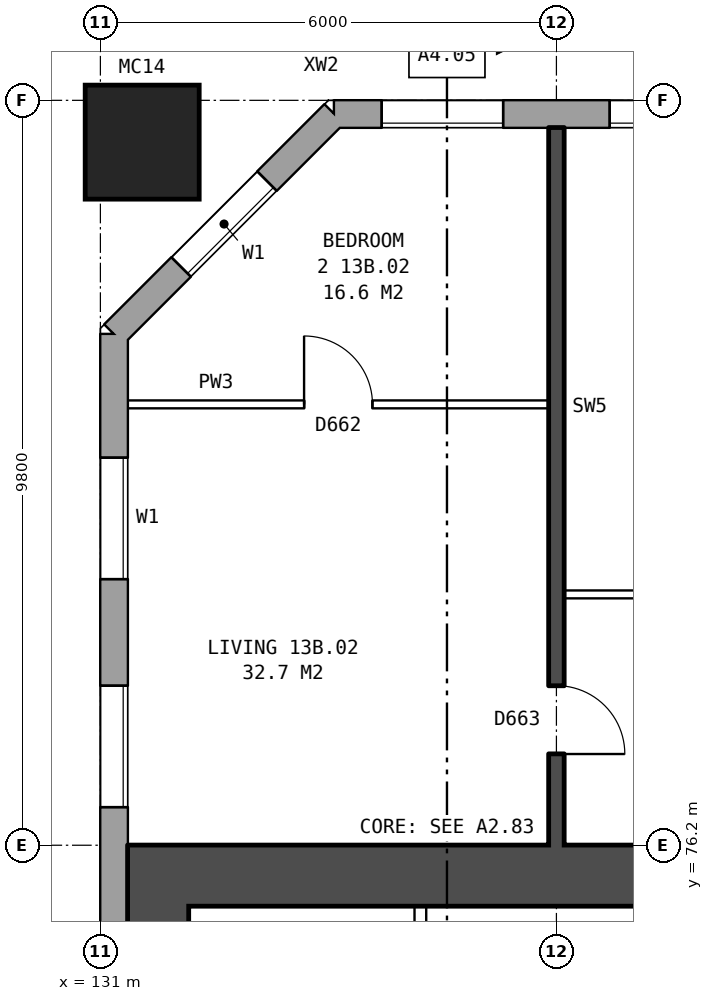
"""IFC4 building model, lengths in metres.
Left out: names, types, materials, properties, quantities, classifications, styles, units other than length and angle.
Written with IfcOpenShell. Run it as: python <this file> out.ifc"""

import sys

from ifc_helpers import new_model, si_unit, direction, frame, frame_2d, origin, origin_2d, place, context, subcontext, project, spatial, rectangle, hollow_rectangle, extrude, element, fill, save


model = new_model("IFC4")
c1 = context("Model", 3, precision=1e-05, world=origin(), true_north=direction((0.0, 1.0)))
c2 = subcontext(c1, "Body", "Model", "MODEL_VIEW")
j1 = project(units=[si_unit("LENGTHUNIT", "METRE"), si_unit("PLANEANGLEUNIT", "RADIAN")], contexts=[c1])
p1 = place(None, origin())
s1 = spatial("IfcSite", under=j1, at=p1, CompositionType="ELEMENT")
p2 = place(p1, origin())
s2 = spatial("IfcBuilding", under=s1, at=p2, CompositionType="ELEMENT")
p3 = place(p2, frame((0.0, 0.0, 50.5)))
s3 = spatial("IfcBuildingStorey", under=s2, at=p3, CompositionType="ELEMENT", Elevation=50.5)
p4 = place(p3, frame((131.55, 85.45, 0.0), z_axis=(0.0, 0.0, 1.0), x_axis=(1.0, 0.0, 0.0)))
e1 = element("IfcColumn", 1, at=p4, inside=s3, PredefinedType="COLUMN", context=c2, shape_type="SweptSolid", body=[
    extrude(hollow_rectangle(XDim=1.5, YDim=1.5, WallThickness=0.08, at=origin_2d()), origin(), (0.0, 0.0, 1.0), 3.1),
])
p5 = place(p3, frame((173.425, 85.82, 0.0), z_axis=(0.0, 0.0, 1.0), x_axis=(-1.0, 0.0, 0.0)))
e2 = element("IfcWall", 2, at=p5, inside=s3, PredefinedType="STANDARD", context=c2, shape_type="SweptSolid", body=[
    extrude(rectangle(XDim=39.351, YDim=0.36, at=frame_2d((19.675, 0.0))), origin(), (0.0, 0.0, 1.0), 2.85),
])
p6 = place(p5, frame((1.125, 0.0, 0.8)))
e3 = element("IfcOpeningElement", 3, at=p6, cuts=e2, PredefinedType="OPENING", context=c2, shape_type="SweptSolid", body=[
    extrude(rectangle(XDim=1.6, YDim=1.8, at=frame_2d((0.8, 0.9))), frame((0.0, 0.19, 0.0), z_axis=(0.0, -1.0, 0.0), x_axis=(1.0, 0.0, 0.0)), (0.0, 0.0, 1.0), 0.38),
])
p7 = place(p5, frame((4.125, 0.0, 0.8)))
e4 = element("IfcOpeningElement", 4, at=p7, cuts=e2, PredefinedType="OPENING", context=c2, shape_type="SweptSolid", body=[
    extrude(rectangle(XDim=1.6, YDim=1.8, at=frame_2d((0.8, 0.9))), frame((0.0, 0.19, 0.0), z_axis=(0.0, -1.0, 0.0), x_axis=(1.0, 0.0, 0.0)), (0.0, 0.0, 1.0), 0.38),
])
p8 = place(p5, frame((7.725, 0.0, 0.8)))
e5 = element("IfcOpeningElement", 5, at=p8, cuts=e2, PredefinedType="OPENING", context=c2, shape_type="SweptSolid", body=[
    extrude(rectangle(XDim=0.6, YDim=0.9, at=frame_2d((0.3, 0.45))), frame((0.0, 0.19, 0.0), z_axis=(0.0, -1.0, 0.0), x_axis=(1.0, 0.0, 0.0)), (0.0, 0.0, 1.0), 0.38),
])
p9 = place(p5, frame((10.125, 0.0, 0.8)))
e6 = element("IfcOpeningElement", 6, at=p9, cuts=e2, PredefinedType="OPENING", context=c2, shape_type="SweptSolid", body=[
    extrude(rectangle(XDim=1.6, YDim=1.8, at=frame_2d((0.8, 0.9))), frame((0.0, 0.19, 0.0), z_axis=(0.0, -1.0, 0.0), x_axis=(1.0, 0.0, 0.0)), (0.0, 0.0, 1.0), 0.38),
])
p10 = place(p5, frame((13.125, 0.0, 0.8)))
e7 = element("IfcOpeningElement", 7, at=p10, cuts=e2, PredefinedType="OPENING", context=c2, shape_type="SweptSolid", body=[
    extrude(rectangle(XDim=1.6, YDim=1.8, at=frame_2d((0.8, 0.9))), frame((0.0, 0.19, 0.0), z_axis=(0.0, -1.0, 0.0), x_axis=(1.0, 0.0, 0.0)), (0.0, 0.0, 1.0), 0.38),
])
p11 = place(p5, frame((16.125, 0.0, 0.8)))
e8 = element("IfcOpeningElement", 8, at=p11, cuts=e2, PredefinedType="OPENING", context=c2, shape_type="SweptSolid", body=[
    extrude(rectangle(XDim=1.6, YDim=1.8, at=frame_2d((0.8, 0.9))), frame((0.0, 0.19, 0.0), z_axis=(0.0, -1.0, 0.0), x_axis=(1.0, 0.0, 0.0)), (0.0, 0.0, 1.0), 0.38),
])
p12 = place(p5, frame((19.125, 0.0, 0.8)))
e9 = element("IfcOpeningElement", 9, at=p12, cuts=e2, PredefinedType="OPENING", context=c2, shape_type="SweptSolid", body=[
    extrude(rectangle(XDim=1.6, YDim=1.8, at=frame_2d((0.8, 0.9))), frame((0.0, 0.19, 0.0), z_axis=(0.0, -1.0, 0.0), x_axis=(1.0, 0.0, 0.0)), (0.0, 0.0, 1.0), 0.38),
])
p13 = place(p5, frame((22.125, 0.0, 0.8)))
e10 = element("IfcOpeningElement", 10, at=p13, cuts=e2, PredefinedType="OPENING", context=c2, shape_type="SweptSolid", body=[
    extrude(rectangle(XDim=1.6, YDim=1.8, at=frame_2d((0.8, 0.9))), frame((0.0, 0.19, 0.0), z_axis=(0.0, -1.0, 0.0), x_axis=(1.0, 0.0, 0.0)), (0.0, 0.0, 1.0), 0.38),
])
p14 = place(p5, frame((25.125, 0.0, 0.8)))
e11 = element("IfcOpeningElement", 11, at=p14, cuts=e2, PredefinedType="OPENING", context=c2, shape_type="SweptSolid", body=[
    extrude(rectangle(XDim=1.6, YDim=1.8, at=frame_2d((0.8, 0.9))), frame((0.0, 0.19, 0.0), z_axis=(0.0, -1.0, 0.0), x_axis=(1.0, 0.0, 0.0)), (0.0, 0.0, 1.0), 0.38),
])
p15 = place(p5, frame((28.125, 0.0, 0.8)))
e12 = element("IfcOpeningElement", 12, at=p15, cuts=e2, PredefinedType="OPENING", context=c2, shape_type="SweptSolid", body=[
    extrude(rectangle(XDim=1.6, YDim=1.8, at=frame_2d((0.8, 0.9))), frame((0.0, 0.19, 0.0), z_axis=(0.0, -1.0, 0.0), x_axis=(1.0, 0.0, 0.0)), (0.0, 0.0, 1.0), 0.38),
])
p16 = place(p5, frame((30.625, 0.0, 0.8)))
e13 = element("IfcOpeningElement", 13, at=p16, cuts=e2, PredefinedType="OPENING", context=c2, shape_type="SweptSolid", body=[
    extrude(rectangle(XDim=1.0, YDim=0.9, at=frame_2d((0.5, 0.45))), frame((0.0, 0.19, 0.0), z_axis=(0.0, -1.0, 0.0), x_axis=(1.0, 0.0, 0.0)), (0.0, 0.0, 1.0), 0.38),
])
p17 = place(p5, frame((34.125, 0.0, 0.8)))
e14 = element("IfcOpeningElement", 14, at=p17, cuts=e2, PredefinedType="OPENING", context=c2, shape_type="SweptSolid", body=[
    extrude(rectangle(XDim=1.6, YDim=1.8, at=frame_2d((0.8, 0.9))), frame((0.0, 0.19, 0.0), z_axis=(0.0, -1.0, 0.0), x_axis=(1.0, 0.0, 0.0)), (0.0, 0.0, 1.0), 0.38),
])
p18 = place(p5, frame((37.125, 0.0, 0.8)))
e15 = element("IfcOpeningElement", 15, at=p18, cuts=e2, PredefinedType="OPENING", context=c2, shape_type="SweptSolid", body=[
    extrude(rectangle(XDim=1.6, YDim=1.8, at=frame_2d((0.8, 0.9))), frame((0.0, 0.19, 0.0), z_axis=(0.0, -1.0, 0.0), x_axis=(1.0, 0.0, 0.0)), (0.0, 0.0, 1.0), 0.38),
])
p19 = place(p5, frame((8.625, 0.0, 0.8)))
e16 = element("IfcOpeningElement", 16, at=p19, cuts=e2, PredefinedType="OPENING", context=c2, shape_type="SweptSolid", body=[
    extrude(rectangle(XDim=0.6, YDim=1.5, at=frame_2d((0.3, 0.75))), frame((0.0, 0.19, 0.0), z_axis=(0.0, -1.0, 0.0), x_axis=(1.0, 0.0, 0.0)), (0.0, 0.0, 1.0), 0.38),
])
p20 = place(p5, frame((32.875, 0.0, 1.7)))
e17 = element("IfcOpeningElement", 17, at=p20, cuts=e2, PredefinedType="OPENING", context=c2, shape_type="SweptSolid", body=[
    extrude(rectangle(XDim=0.8, YDim=0.9, at=frame_2d((0.4, 0.45))), frame((0.0, 0.19, 0.0), z_axis=(0.0, -1.0, 0.0), x_axis=(1.0, 0.0, 0.0)), (0.0, 0.0, 1.0), 0.38),
])
p21 = place(p3, frame((134.075, 85.82, 0.0), z_axis=(0.0, 0.0, 1.0), x_axis=(-0.707106781187, -0.707106781187, 0.0)))
e18 = element("IfcWall", 18, at=p21, inside=s3, PredefinedType="STANDARD", context=c2, shape_type="SweptSolid", body=[
    extrude(rectangle(XDim=4.094, YDim=0.36, at=frame_2d((2.047, 0.0))), origin(), (0.0, 0.0, 1.0), 2.85),
])
p22 = place(p21, frame((1.247, 0.0, 0.8)))
e19 = element("IfcOpeningElement", 19, at=p22, cuts=e18, PredefinedType="OPENING", context=c2, shape_type="SweptSolid", body=[
    extrude(rectangle(XDim=1.6, YDim=1.8, at=frame_2d((0.8, 0.9))), frame((0.0, 0.19, 0.0), z_axis=(0.0, -1.0, 0.0), x_axis=(1.0, 0.0, 0.0)), (0.0, 0.0, 1.0), 0.38),
])
p23 = place(p3, frame((131.18, 82.925, 0.0), z_axis=(0.0, 0.0, 1.0), x_axis=(0.0, -1.0, 0.0)))
e20 = element("IfcWall", 20, at=p23, inside=s3, PredefinedType="STANDARD", context=c2, shape_type="SweptSolid", body=[
    extrude(rectangle(XDim=25.851, YDim=0.36, at=frame_2d((12.925, 0.0))), origin(), (0.0, 0.0, 1.0), 2.85),
])
p24 = place(p23, frame((1.625, 0.0, 0.8)))
e21 = element("IfcOpeningElement", 21, at=p24, cuts=e20, PredefinedType="OPENING", context=c2, shape_type="SweptSolid", body=[
    extrude(rectangle(XDim=1.6, YDim=1.8, at=frame_2d((0.8, 0.9))), frame((0.0, 0.19, 0.0), z_axis=(0.0, -1.0, 0.0), x_axis=(1.0, 0.0, 0.0)), (0.0, 0.0, 1.0), 0.38),
])
p25 = place(p23, frame((4.625, 0.0, 0.8)))
e22 = element("IfcOpeningElement", 22, at=p25, cuts=e20, PredefinedType="OPENING", context=c2, shape_type="SweptSolid", body=[
    extrude(rectangle(XDim=1.6, YDim=1.8, at=frame_2d((0.8, 0.9))), frame((0.0, 0.19, 0.0), z_axis=(0.0, -1.0, 0.0), x_axis=(1.0, 0.0, 0.0)), (0.0, 0.0, 1.0), 0.38),
])
p26 = place(p23, frame((19.625, 0.0, 0.8)))
e23 = element("IfcOpeningElement", 23, at=p26, cuts=e20, PredefinedType="OPENING", context=c2, shape_type="SweptSolid", body=[
    extrude(rectangle(XDim=1.6, YDim=1.8, at=frame_2d((0.8, 0.9))), frame((0.0, 0.19, 0.0), z_axis=(0.0, -1.0, 0.0), x_axis=(1.0, 0.0, 0.0)), (0.0, 0.0, 1.0), 0.38),
])
p27 = place(p23, frame((22.625, 0.0, 0.8)))
e24 = element("IfcOpeningElement", 24, at=p27, cuts=e20, PredefinedType="OPENING", context=c2, shape_type="SweptSolid", body=[
    extrude(rectangle(XDim=1.6, YDim=1.8, at=frame_2d((0.8, 0.9))), frame((0.0, 0.19, 0.0), z_axis=(0.0, -1.0, 0.0), x_axis=(1.0, 0.0, 0.0)), (0.0, 0.0, 1.0), 0.38),
])
p28 = place(p3, frame((131.76, 64.6, 0.0), z_axis=(0.0, 0.0, 1.0), x_axis=(0.0, 1.0, 0.0)))
e25 = element("IfcWall", 25, at=p28, inside=s3, PredefinedType="SHEAR", context=c2, shape_type="SweptSolid", body=[
    extrude(rectangle(XDim=10.8, YDim=0.8, at=frame_2d((5.4, 0.0))), origin(), (0.0, 0.0, 1.0), 2.85),
])
p29 = place(p3, frame((139.76, 75.8, 0.0), z_axis=(0.0, 0.0, 1.0), x_axis=(-1.0, 0.0, 0.0)))
e26 = element("IfcWall", 26, at=p29, inside=s3, PredefinedType="SHEAR", context=c2, shape_type="SweptSolid", body=[
    extrude(rectangle(XDim=8.4, YDim=0.8, at=frame_2d((4.2, 0.0))), origin(), (0.0, 0.0, 1.0), 2.85),
])
p30 = place(p3, frame((135.21, 71.425, 0.0), z_axis=(0.0, 0.0, 1.0), x_axis=(0.0, 1.0, 0.0)))
e27 = element("IfcWall", 27, at=p30, inside=s3, PredefinedType="PARTITIONING", context=c2, shape_type="SweptSolid", body=[
    extrude(rectangle(XDim=3.975, YDim=0.15, at=frame_2d((1.987, 0.0))), origin(), (0.0, 0.0, 1.0), 2.85),
])
p31 = place(p30, frame((0.462, 0.0, 0.0)))
e28 = element("IfcOpeningElement", 28, at=p31, cuts=e27, PredefinedType="OPENING", context=c2, shape_type="SweptSolid", body=[
    extrude(rectangle(XDim=1.1, YDim=2.1, at=frame_2d((0.55, 1.05))), frame((0.0, 0.085, 0.0), z_axis=(0.0, -1.0, 0.0), x_axis=(1.0, 0.0, 0.0)), (0.0, 0.0, 1.0), 0.17),
])
p32 = place(p3, frame((137.1, 79.5, 0.0), z_axis=(0.0, 0.0, 1.0), x_axis=(1.0, 0.0, 0.0)))
e29 = element("IfcWall", 29, at=p32, inside=s3, PredefinedType="PARTITIONING", context=c2, shape_type="SweptSolid", body=[
    extrude(rectangle(XDim=5.8, YDim=0.1, at=frame_2d((2.9, 0.0))), origin(), (0.0, 0.0, 1.0), 2.85),
])
p33 = place(p32, frame((1.3, 0.0, 0.0)))
e30 = element("IfcOpeningElement", 30, at=p33, cuts=e29, PredefinedType="OPENING", context=c2, shape_type="SweptSolid", body=[
    extrude(rectangle(XDim=0.9, YDim=2.1, at=frame_2d((0.45, 1.05))), frame((0.0, 0.06, 0.0), z_axis=(0.0, -1.0, 0.0), x_axis=(1.0, 0.0, 0.0)), (0.0, 0.0, 1.0), 0.12),
])
p34 = place(p32, frame((4.2, 0.0, 0.0)))
e31 = element("IfcOpeningElement", 31, at=p34, cuts=e29, PredefinedType="OPENING", context=c2, shape_type="SweptSolid", body=[
    extrude(rectangle(XDim=0.9, YDim=2.1, at=frame_2d((0.45, 1.05))), frame((0.0, 0.06, 0.0), z_axis=(0.0, -1.0, 0.0), x_axis=(1.0, 0.0, 0.0)), (0.0, 0.0, 1.0), 0.12),
])
p35 = place(p3, frame((131.36, 82.0, 0.0), z_axis=(0.0, 0.0, 1.0), x_axis=(1.0, 0.0, 0.0)))
e32 = element("IfcWall", 32, at=p35, inside=s3, PredefinedType="PARTITIONING", context=c2, shape_type="SweptSolid", body=[
    extrude(rectangle(XDim=5.54, YDim=0.1, at=frame_2d((2.77, 0.0))), origin(), (0.0, 0.0, 1.0), 2.85),
])
p36 = place(p35, frame((2.32, 0.0, 0.0)))
e33 = element("IfcOpeningElement", 33, at=p36, cuts=e32, PredefinedType="OPENING", context=c2, shape_type="SweptSolid", body=[
    extrude(rectangle(XDim=0.9, YDim=2.1, at=frame_2d((0.45, 1.05))), frame((0.0, 0.06, 0.0), z_axis=(0.0, -1.0, 0.0), x_axis=(1.0, 0.0, 0.0)), (0.0, 0.0, 1.0), 0.12),
])
p37 = place(p3, frame((137.0, 76.2, 0.0), z_axis=(0.0, 0.0, 1.0), x_axis=(0.0, 1.0, 0.0)))
e34 = element("IfcWall", 34, at=p37, inside=s3, PredefinedType="SOLIDWALL", context=c2, shape_type="SweptSolid", body=[
    extrude(rectangle(XDim=9.44, YDim=0.2, at=frame_2d((4.72, 0.0))), origin(), (0.0, 0.0, 1.0), 2.85),
])
p38 = place(p37, frame((1.2, 0.0, 0.0)))
e35 = element("IfcOpeningElement", 35, at=p38, cuts=e34, PredefinedType="OPENING", context=c2, shape_type="SweptSolid", body=[
    extrude(rectangle(XDim=0.9, YDim=2.1, at=frame_2d((0.45, 1.05))), frame((0.0, 0.11, 0.0), z_axis=(0.0, -1.0, 0.0), x_axis=(1.0, 0.0, 0.0)), (0.0, 0.0, 1.0), 0.22),
])
p39 = place(p17, origin())
e36 = element("IfcWindow", 36, at=p39, inside=s3, PartitioningType="SINGLE_PANEL", PredefinedType="WINDOW", context=c2, shape_type="SweptSolid", body=[
    extrude(rectangle(XDim=1.6, YDim=1.8, at=frame_2d((0.8, 0.9))), frame((0.0, 0.15, 0.0), z_axis=(0.0, -1.0, 0.0), x_axis=(1.0, 0.0, 0.0)), (0.0, 0.0, 1.0), 0.06),
])
fill(e14, e36)
p40 = place(p18, origin())
e37 = element("IfcWindow", 37, at=p40, inside=s3, PartitioningType="SINGLE_PANEL", PredefinedType="WINDOW", context=c2, shape_type="SweptSolid", body=[
    extrude(rectangle(XDim=1.6, YDim=1.8, at=frame_2d((0.8, 0.9))), frame((0.0, 0.15, 0.0), z_axis=(0.0, -1.0, 0.0), x_axis=(1.0, 0.0, 0.0)), (0.0, 0.0, 1.0), 0.06),
])
fill(e15, e37)
p41 = place(p22, origin())
e38 = element("IfcWindow", 38, at=p41, inside=s3, PartitioningType="SINGLE_PANEL", PredefinedType="WINDOW", context=c2, shape_type="SweptSolid", body=[
    extrude(rectangle(XDim=1.6, YDim=1.8, at=frame_2d((0.8, 0.9))), frame((0.0, 0.15, 0.0), z_axis=(0.0, -1.0, 0.0), x_axis=(1.0, 0.0, 0.0)), (0.0, 0.0, 1.0), 0.06),
])
fill(e19, e38)
p42 = place(p24, origin())
e39 = element("IfcWindow", 39, at=p42, inside=s3, PartitioningType="SINGLE_PANEL", PredefinedType="WINDOW", context=c2, shape_type="SweptSolid", body=[
    extrude(rectangle(XDim=1.6, YDim=1.8, at=frame_2d((0.8, 0.9))), frame((0.0, 0.15, 0.0), z_axis=(0.0, -1.0, 0.0), x_axis=(1.0, 0.0, 0.0)), (0.0, 0.0, 1.0), 0.06),
])
fill(e21, e39)
p43 = place(p25, origin())
e40 = element("IfcWindow", 40, at=p43, inside=s3, PartitioningType="SINGLE_PANEL", PredefinedType="WINDOW", context=c2, shape_type="SweptSolid", body=[
    extrude(rectangle(XDim=1.6, YDim=1.8, at=frame_2d((0.8, 0.9))), frame((0.0, 0.15, 0.0), z_axis=(0.0, -1.0, 0.0), x_axis=(1.0, 0.0, 0.0)), (0.0, 0.0, 1.0), 0.06),
])
fill(e22, e40)
p44 = place(p36, origin())
e41 = element("IfcDoor", 41, at=p44, inside=s3, OperationType="SINGLE_SWING_LEFT", PredefinedType="DOOR", context=c2, shape_type="SweptSolid", body=[
    extrude(rectangle(XDim=0.9, YDim=2.1, at=frame_2d((0.45, 1.05))), frame((0.0, 0.025, 0.0), z_axis=(0.0, -1.0, 0.0), x_axis=(1.0, 0.0, 0.0)), (0.0, 0.0, 1.0), 0.05),
])
fill(e33, e41)
p45 = place(p38, frame((0.9, 0.0, 0.0), z_axis=(0.0, 0.0, 1.0), x_axis=(-1.0, 0.0, 0.0)))
e42 = element("IfcDoor", 42, at=p45, inside=s3, OperationType="SINGLE_SWING_RIGHT", PredefinedType="DOOR", context=c2, shape_type="SweptSolid", body=[
    extrude(rectangle(XDim=0.9, YDim=2.1, at=frame_2d((0.45, 1.05))), frame((0.0, 0.025, 0.0), z_axis=(0.0, -1.0, 0.0), x_axis=(1.0, 0.0, 0.0)), (0.0, 0.0, 1.0), 0.05),
])
fill(e35, e42)
save(model, sys.argv[1])
